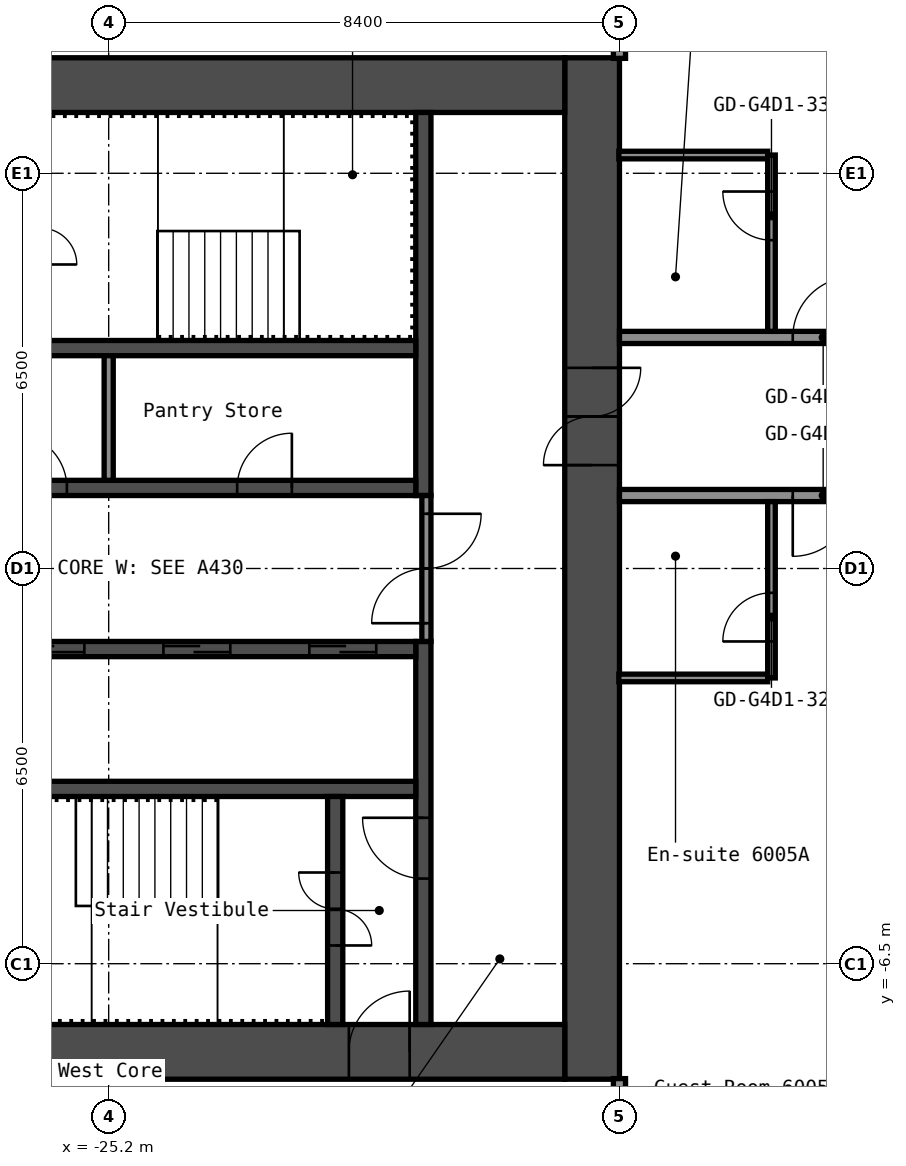
"""IFC4 building model, lengths in metres.
Left out: names, types, materials, properties, quantities, classifications, styles, units other than length and angle.
Written with IfcOpenShell. Run it as: python <this file> out.ifc"""

import sys

from ifc_helpers import new_model, si_unit, direction, frame, frame_2d, origin, place, context, subcontext, project, spatial, rectangle, extrude, element, fill, save


model = new_model("IFC4")
c1 = context("Model", 3, precision=1e-05, world=origin(), true_north=direction((0.0, 1.0)))
c2 = subcontext(c1, "Body", "Model", "MODEL_VIEW")
j1 = project(units=[si_unit("LENGTHUNIT", "METRE"), si_unit("PLANEANGLEUNIT", "RADIAN")], contexts=[c1])
p1 = place(None, origin())
s1 = spatial("IfcSite", under=j1, at=p1, CompositionType="ELEMENT")
p2 = place(p1, origin())
s2 = spatial("IfcBuilding", under=s1, at=p2, CompositionType="ELEMENT")
p3 = place(p2, frame((0.0, 0.0, 212.2)))
s3 = spatial("IfcBuildingStorey", under=s2, at=p3, CompositionType="ELEMENT", Elevation=212.2)
p4 = place(p3, frame((-17.25, -8.4, 0.0), z_axis=(0.0, 0.0, 1.0), x_axis=(0.0, 1.0, 0.0)))
e1 = element("IfcWall", 1, at=p4, inside=s3, PredefinedType="SHEAR", context=c2, shape_type="SweptSolid", body=[
    extrude(rectangle(XDim=16.8, YDim=0.9, at=frame_2d((8.4, 0.0))), origin(), (0.0, 0.0, 1.0), 2.75),
])
p5 = place(p4, frame((10.1, 0.0, 0.0)))
e2 = element("IfcOpeningElement", 2, at=p5, cuts=e1, PredefinedType="OPENING", context=c2, shape_type="SweptSolid", body=[
    extrude(rectangle(XDim=1.6, YDim=2.1, at=frame_2d((0.8, 1.05))), frame((0.0, 0.46, 0.0), z_axis=(0.0, -1.0, 0.0), x_axis=(1.0, 0.0, 0.0)), (0.0, 0.0, 1.0), 0.92),
])
p6 = place(p3, frame((-32.7, 7.95, 0.0), z_axis=(0.0, 0.0, 1.0), x_axis=(1.0, 0.0, 0.0)))
e3 = element("IfcWall", 3, at=p6, inside=s3, PredefinedType="SHEAR", context=c2, shape_type="SweptSolid", body=[
    extrude(rectangle(XDim=15.0, YDim=0.9, at=frame_2d((7.5, 0.0))), origin(), (0.0, 0.0, 1.0), 2.75),
])
p7 = place(p6, frame((3.4, 0.0, 0.0)))
e4 = element("IfcOpeningElement", 4, at=p7, cuts=e3, PredefinedType="OPENING", context=c2, shape_type="SweptSolid", body=[
    extrude(rectangle(XDim=1.2, YDim=2.1, at=frame_2d((0.6, 1.05))), frame((0.0, 0.46, 0.0), z_axis=(0.0, -1.0, 0.0), x_axis=(1.0, 0.0, 0.0)), (0.0, 0.0, 1.0), 0.92),
])
p8 = place(p6, frame((0.75, 0.0, 0.0)))
e5 = element("IfcOpeningElement", 5, at=p8, cuts=e3, PredefinedType="OPENING", context=c2, shape_type="SweptSolid", body=[
    extrude(rectangle(XDim=0.9, YDim=2.1, at=frame_2d((0.45, 1.05))), frame((0.0, 0.46, 0.0), z_axis=(0.0, -1.0, 0.0), x_axis=(1.0, 0.0, 0.0)), (0.0, 0.0, 1.0), 0.92),
])
p9 = place(p3, frame((-32.7, -7.95, 0.0), z_axis=(0.0, 0.0, 1.0), x_axis=(1.0, 0.0, 0.0)))
e6 = element("IfcWall", 6, at=p9, inside=s3, PredefinedType="SHEAR", context=c2, shape_type="SweptSolid", body=[
    extrude(rectangle(XDim=15.0, YDim=0.9, at=frame_2d((7.5, 0.0))), origin(), (0.0, 0.0, 1.0), 2.75),
])
p10 = place(p9, frame((11.45, 0.0, 0.0)))
e7 = element("IfcOpeningElement", 7, at=p10, cuts=e6, PredefinedType="OPENING", context=c2, shape_type="SweptSolid", body=[
    extrude(rectangle(XDim=1.0, YDim=2.1, at=frame_2d((0.5, 1.05))), frame((0.0, 0.46, 0.0), z_axis=(0.0, -1.0, 0.0), x_axis=(1.0, 0.0, 0.0)), (0.0, 0.0, 1.0), 0.92),
])
p11 = place(p3, frame((-20.025, 1.2, 0.0), z_axis=(0.0, 0.0, 1.0), x_axis=(0.0, 1.0, 0.0)))
e8 = element("IfcWall", 8, at=p11, inside=s3, PredefinedType="SHEAR", context=c2, shape_type="SweptSolid", body=[
    extrude(rectangle(XDim=6.3, YDim=0.25, at=frame_2d((3.15, 0.0))), origin(), (0.0, 0.0, 1.0), 2.75),
])
p12 = place(p3, frame((-20.025, -7.5, 0.0), z_axis=(0.0, 0.0, 1.0), x_axis=(0.0, 1.0, 0.0)))
e9 = element("IfcWall", 9, at=p12, inside=s3, PredefinedType="SHEAR", context=c2, shape_type="SweptSolid", body=[
    extrude(rectangle(XDim=6.3, YDim=0.25, at=frame_2d((3.15, 0.0))), origin(), (0.0, 0.0, 1.0), 2.75),
])
p13 = place(p12, frame((2.4, 0.0, 0.0)))
e10 = element("IfcOpeningElement", 10, at=p13, cuts=e9, PredefinedType="OPENING", context=c2, shape_type="SweptSolid", body=[
    extrude(rectangle(XDim=1.0, YDim=2.1, at=frame_2d((0.5, 1.05))), frame((0.0, 0.135, 0.0), z_axis=(0.0, -1.0, 0.0), x_axis=(1.0, 0.0, 0.0)), (0.0, 0.0, 1.0), 0.27),
])
p14 = place(p3, frame((-27.65, 1.325, 0.0), z_axis=(0.0, 0.0, 1.0), x_axis=(1.0, 0.0, 0.0)))
e11 = element("IfcWall", 11, at=p14, inside=s3, PredefinedType="SHEAR", context=c2, shape_type="SweptSolid", body=[
    extrude(rectangle(XDim=7.5, YDim=0.25, at=frame_2d((3.75, 0.0))), origin(), (0.0, 0.0, 1.0), 2.75),
])
p15 = place(p14, frame((4.562, 0.0, 0.0)))
e12 = element("IfcOpeningElement", 12, at=p15, cuts=e11, PredefinedType="OPENING", context=c2, shape_type="SweptSolid", body=[
    extrude(rectangle(XDim=0.9, YDim=2.1, at=frame_2d((0.45, 1.05))), frame((0.0, 0.135, 0.0), z_axis=(0.0, -1.0, 0.0), x_axis=(1.0, 0.0, 0.0)), (0.0, 0.0, 1.0), 0.27),
])
p16 = place(p14, frame((0.863, 0.0, 0.0)))
e13 = element("IfcOpeningElement", 13, at=p16, cuts=e11, PredefinedType="OPENING", context=c2, shape_type="SweptSolid", body=[
    extrude(rectangle(XDim=0.9, YDim=2.1, at=frame_2d((0.45, 1.05))), frame((0.0, 0.135, 0.0), z_axis=(0.0, -1.0, 0.0), x_axis=(1.0, 0.0, 0.0)), (0.0, 0.0, 1.0), 0.27),
])
p17 = place(p3, frame((-27.65, 3.625, 0.0), z_axis=(0.0, 0.0, 1.0), x_axis=(1.0, 0.0, 0.0)))
e14 = element("IfcWall", 14, at=p17, inside=s3, PredefinedType="SHEAR", context=c2, shape_type="SweptSolid", body=[
    extrude(rectangle(XDim=7.5, YDim=0.25, at=frame_2d((3.75, 0.0))), origin(), (0.0, 0.0, 1.0), 2.75),
])
p18 = place(p3, frame((-27.65, -1.325, 0.0), z_axis=(0.0, 0.0, 1.0), x_axis=(1.0, 0.0, 0.0)))
e15 = element("IfcWall", 15, at=p18, inside=s3, PredefinedType="SHEAR", context=c2, shape_type="SweptSolid", body=[
    extrude(rectangle(XDim=7.5, YDim=0.25, at=frame_2d((3.75, 0.0))), origin(), (0.0, 0.0, 1.0), 2.75),
])
p19 = place(p18, frame((5.75, 0.0, 0.0)))
e16 = element("IfcOpeningElement", 16, at=p19, cuts=e15, PredefinedType="OPENING", context=c2, shape_type="SweptSolid", body=[
    extrude(rectangle(XDim=1.1, YDim=2.1, at=frame_2d((0.55, 1.05))), frame((0.0, 0.135, 0.0), z_axis=(0.0, -1.0, 0.0), x_axis=(1.0, 0.0, 0.0)), (0.0, 0.0, 1.0), 0.27),
])
p20 = place(p18, frame((3.35, 0.0, 0.0)))
e17 = element("IfcOpeningElement", 17, at=p20, cuts=e15, PredefinedType="OPENING", context=c2, shape_type="SweptSolid", body=[
    extrude(rectangle(XDim=1.1, YDim=2.1, at=frame_2d((0.55, 1.05))), frame((0.0, 0.135, 0.0), z_axis=(0.0, -1.0, 0.0), x_axis=(1.0, 0.0, 0.0)), (0.0, 0.0, 1.0), 0.27),
])
p21 = place(p18, frame((0.95, 0.0, 0.0)))
e18 = element("IfcOpeningElement", 18, at=p21, cuts=e15, PredefinedType="OPENING", context=c2, shape_type="SweptSolid", body=[
    extrude(rectangle(XDim=1.1, YDim=2.1, at=frame_2d((0.55, 1.05))), frame((0.0, 0.135, 0.0), z_axis=(0.0, -1.0, 0.0), x_axis=(1.0, 0.0, 0.0)), (0.0, 0.0, 1.0), 0.27),
])
p22 = place(p3, frame((-27.65, -3.625, 0.0), z_axis=(0.0, 0.0, 1.0), x_axis=(1.0, 0.0, 0.0)))
e19 = element("IfcWall", 19, at=p22, inside=s3, PredefinedType="SHEAR", context=c2, shape_type="SweptSolid", body=[
    extrude(rectangle(XDim=7.5, YDim=0.25, at=frame_2d((3.75, 0.0))), origin(), (0.0, 0.0, 1.0), 2.75),
])
p23 = place(p3, frame((-21.475, -7.5, 0.0), z_axis=(0.0, 0.0, 1.0), x_axis=(0.0, 1.0, 0.0)))
e20 = element("IfcWall", 20, at=p23, inside=s3, PredefinedType="SHEAR", context=c2, shape_type="SweptSolid", body=[
    extrude(rectangle(XDim=3.75, YDim=0.25, at=frame_2d((1.875, 0.0))), origin(), (0.0, 0.0, 1.0), 2.75),
])
p24 = place(p23, frame((1.3, 0.0, 0.0)))
e21 = element("IfcOpeningElement", 21, at=p24, cuts=e20, PredefinedType="OPENING", context=c2, shape_type="SweptSolid", body=[
    extrude(rectangle(XDim=1.2, YDim=2.1, at=frame_2d((0.6, 1.05))), frame((0.0, 0.135, 0.0), z_axis=(0.0, -1.0, 0.0), x_axis=(1.0, 0.0, 0.0)), (0.0, 0.0, 1.0), 0.27),
])
p25 = place(p3, frame((-19.975, -1.2, 0.0), z_axis=(0.0, 0.0, 1.0), x_axis=(0.0, 1.0, 0.0)))
e22 = element("IfcWall", 22, at=p25, inside=s3, PredefinedType="PARTITIONING", context=c2, shape_type="SweptSolid", body=[
    extrude(rectangle(XDim=2.4, YDim=0.15, at=frame_2d((1.2, 0.0))), origin(), (0.0, 0.0, 1.0), 2.75),
])
p26 = place(p25, frame((0.3, 0.0, 0.0)))
e23 = element("IfcOpeningElement", 23, at=p26, cuts=e22, PredefinedType="OPENING", context=c2, shape_type="SweptSolid", body=[
    extrude(rectangle(XDim=1.8, YDim=2.1, at=frame_2d((0.9, 1.05))), frame((0.0, 0.085, 0.0), z_axis=(0.0, -1.0, 0.0), x_axis=(1.0, 0.0, 0.0)), (0.0, 0.0, 1.0), 0.17),
])
p27 = place(p3, frame((-25.2, 1.45, 0.0), z_axis=(0.0, 0.0, 1.0), x_axis=(0.0, 1.0, 0.0)))
e24 = element("IfcWall", 24, at=p27, inside=s3, PredefinedType="PARTITIONING", context=c2, shape_type="SweptSolid", body=[
    extrude(rectangle(XDim=2.05, YDim=0.15, at=frame_2d((1.025, 0.0))), origin(), (0.0, 0.0, 1.0), 2.75),
])
p28 = place(p3, frame((-16.81, -1.8, 0.0), z_axis=(0.0, 0.0, 1.0), x_axis=(1.0, 0.0, 0.0)))
e25 = element("IfcWall", 25, at=p28, inside=s3, PredefinedType="PARTITIONING", context=c2, shape_type="SweptSolid", body=[
    extrude(rectangle(XDim=2.448, YDim=0.125, at=frame_2d((1.224, 0.0))), origin(), (0.0, 0.0, 1.0), 2.75),
])
p29 = place(p3, frame((-16.8, 1.2, 0.0), z_axis=(0.0, 0.0, 1.0), x_axis=(1.0, 0.0, 0.0)))
e26 = element("IfcWall", 26, at=p29, inside=s3, PredefinedType="PARTITIONING", context=c2, shape_type="SweptSolid", body=[
    extrude(rectangle(XDim=33.6, YDim=0.2, at=frame_2d((16.8, 0.0))), origin(), (0.0, 0.0, 1.0), 2.75),
])
p30 = place(p29, frame((2.85, 0.0, 0.0)))
e27 = element("IfcOpeningElement", 27, at=p30, cuts=e26, PredefinedType="OPENING", context=c2, shape_type="SweptSolid", body=[
    extrude(rectangle(XDim=1.0, YDim=2.1, at=frame_2d((0.5, 1.05))), frame((0.0, 0.11, 0.0), z_axis=(0.0, -1.0, 0.0), x_axis=(1.0, 0.0, 0.0)), (0.0, 0.0, 1.0), 0.22),
])
p31 = place(p29, frame((4.55, 0.0, 0.0)))
e28 = element("IfcOpeningElement", 28, at=p31, cuts=e26, PredefinedType="OPENING", context=c2, shape_type="SweptSolid", body=[
    extrude(rectangle(XDim=1.0, YDim=2.1, at=frame_2d((0.5, 1.05))), frame((0.0, 0.11, 0.0), z_axis=(0.0, -1.0, 0.0), x_axis=(1.0, 0.0, 0.0)), (0.0, 0.0, 1.0), 0.22),
])
p32 = place(p29, frame((12.1, 0.0, 0.0)))
e29 = element("IfcOpeningElement", 29, at=p32, cuts=e26, PredefinedType="OPENING", context=c2, shape_type="SweptSolid", body=[
    extrude(rectangle(XDim=1.0, YDim=2.1, at=frame_2d((0.5, 1.05))), frame((0.0, 0.11, 0.0), z_axis=(0.0, -1.0, 0.0), x_axis=(1.0, 0.0, 0.0)), (0.0, 0.0, 1.0), 0.22),
])
p33 = place(p29, frame((22.3, 0.0, 0.0)))
e30 = element("IfcOpeningElement", 30, at=p33, cuts=e26, PredefinedType="OPENING", context=c2, shape_type="SweptSolid", body=[
    extrude(rectangle(XDim=1.0, YDim=2.1, at=frame_2d((0.5, 1.05))), frame((0.0, 0.11, 0.0), z_axis=(0.0, -1.0, 0.0), x_axis=(1.0, 0.0, 0.0)), (0.0, 0.0, 1.0), 0.22),
])
p34 = place(p29, frame((27.2, 0.0, 0.0)))
e31 = element("IfcOpeningElement", 31, at=p34, cuts=e26, PredefinedType="OPENING", context=c2, shape_type="SweptSolid", body=[
    extrude(rectangle(XDim=1.0, YDim=2.1, at=frame_2d((0.5, 1.05))), frame((0.0, 0.11, 0.0), z_axis=(0.0, -1.0, 0.0), x_axis=(1.0, 0.0, 0.0)), (0.0, 0.0, 1.0), 0.22),
])
p35 = place(p3, frame((-16.8, 3.8, 0.0), z_axis=(0.0, 0.0, 1.0), x_axis=(1.0, 0.0, 0.0)))
e32 = element("IfcWall", 32, at=p35, inside=s3, PredefinedType="PARTITIONING", context=c2, shape_type="SweptSolid", body=[
    extrude(rectangle(XDim=33.6, YDim=0.2, at=frame_2d((16.8, 0.0))), origin(), (0.0, 0.0, 1.0), 2.75),
])
p36 = place(p35, frame((2.85, 0.0, 0.0)))
e33 = element("IfcOpeningElement", 33, at=p36, cuts=e32, PredefinedType="OPENING", context=c2, shape_type="SweptSolid", body=[
    extrude(rectangle(XDim=1.0, YDim=2.1, at=frame_2d((0.5, 1.05))), frame((0.0, 0.11, 0.0), z_axis=(0.0, -1.0, 0.0), x_axis=(1.0, 0.0, 0.0)), (0.0, 0.0, 1.0), 0.22),
])
p37 = place(p35, frame((4.55, 0.0, 0.0)))
e34 = element("IfcOpeningElement", 34, at=p37, cuts=e32, PredefinedType="OPENING", context=c2, shape_type="SweptSolid", body=[
    extrude(rectangle(XDim=1.0, YDim=2.1, at=frame_2d((0.5, 1.05))), frame((0.0, 0.11, 0.0), z_axis=(0.0, -1.0, 0.0), x_axis=(1.0, 0.0, 0.0)), (0.0, 0.0, 1.0), 0.22),
])
p38 = place(p35, frame((10.4, 0.0, 0.0)))
e35 = element("IfcOpeningElement", 35, at=p38, cuts=e32, PredefinedType="OPENING", context=c2, shape_type="SweptSolid", body=[
    extrude(rectangle(XDim=1.0, YDim=2.1, at=frame_2d((0.5, 1.05))), frame((0.0, 0.11, 0.0), z_axis=(0.0, -1.0, 0.0), x_axis=(1.0, 0.0, 0.0)), (0.0, 0.0, 1.0), 0.22),
])
p39 = place(p35, frame((19.65, 0.0, 0.0)))
e36 = element("IfcOpeningElement", 36, at=p39, cuts=e32, PredefinedType="OPENING", context=c2, shape_type="SweptSolid", body=[
    extrude(rectangle(XDim=1.0, YDim=2.1, at=frame_2d((0.5, 1.05))), frame((0.0, 0.11, 0.0), z_axis=(0.0, -1.0, 0.0), x_axis=(1.0, 0.0, 0.0)), (0.0, 0.0, 1.0), 0.22),
])
p40 = place(p35, frame((21.35, 0.0, 0.0)))
e37 = element("IfcOpeningElement", 37, at=p40, cuts=e32, PredefinedType="OPENING", context=c2, shape_type="SweptSolid", body=[
    extrude(rectangle(XDim=1.0, YDim=2.1, at=frame_2d((0.5, 1.05))), frame((0.0, 0.11, 0.0), z_axis=(0.0, -1.0, 0.0), x_axis=(1.0, 0.0, 0.0)), (0.0, 0.0, 1.0), 0.22),
])
p41 = place(p35, frame((27.2, 0.0, 0.0)))
e38 = element("IfcOpeningElement", 38, at=p41, cuts=e32, PredefinedType="OPENING", context=c2, shape_type="SweptSolid", body=[
    extrude(rectangle(XDim=1.0, YDim=2.1, at=frame_2d((0.5, 1.05))), frame((0.0, 0.11, 0.0), z_axis=(0.0, -1.0, 0.0), x_axis=(1.0, 0.0, 0.0)), (0.0, 0.0, 1.0), 0.22),
])
p42 = place(p3, frame((-16.81, 6.8, 0.0), z_axis=(0.0, 0.0, 1.0), x_axis=(1.0, 0.0, 0.0)))
e39 = element("IfcWall", 39, at=p42, inside=s3, PredefinedType="PARTITIONING", context=c2, shape_type="SweptSolid", body=[
    extrude(rectangle(XDim=2.448, YDim=0.125, at=frame_2d((1.224, 0.0))), origin(), (0.0, 0.0, 1.0), 2.75),
])
p43 = place(p3, frame((-16.8, -15.55, 0.0), z_axis=(0.0, 0.0, 1.0), x_axis=(0.0, 1.0, 0.0)))
e40 = element("IfcWall", 40, at=p43, inside=s3, PredefinedType="PARTITIONING", context=c2, shape_type="SweptSolid", body=[
    extrude(rectangle(XDim=7.16, YDim=0.2, at=frame_2d((3.58, 0.0))), origin(), (0.0, 0.0, 1.0), 2.75),
])
p44 = place(p3, frame((-16.8, 8.39, 0.0), z_axis=(0.0, 0.0, 1.0), x_axis=(0.0, 1.0, 0.0)))
e41 = element("IfcWall", 41, at=p44, inside=s3, PredefinedType="PARTITIONING", context=c2, shape_type="SweptSolid", body=[
    extrude(rectangle(XDim=12.16, YDim=0.2, at=frame_2d((6.08, 0.0))), origin(), (0.0, 0.0, 1.0), 2.75),
])
p45 = place(p3, frame((-14.3, -1.8, 0.0), z_axis=(0.0, 0.0, 1.0), x_axis=(0.0, 1.0, 0.0)))
e42 = element("IfcWall", 42, at=p45, inside=s3, PredefinedType="PARTITIONING", context=c2, shape_type="SweptSolid", body=[
    extrude(rectangle(XDim=2.9, YDim=0.125, at=frame_2d((1.45, 0.0))), origin(), (0.0, 0.0, 1.0), 2.75),
])
p46 = place(p45, frame((0.6, 0.0, 0.0)))
e43 = element("IfcOpeningElement", 43, at=p46, cuts=e42, PredefinedType="OPENING", context=c2, shape_type="SweptSolid", body=[
    extrude(rectangle(XDim=0.8, YDim=2.1, at=frame_2d((0.4, 1.05))), frame((0.0, 0.073, 0.0), z_axis=(0.0, -1.0, 0.0), x_axis=(1.0, 0.0, 0.0)), (0.0, 0.0, 1.0), 0.145),
])
p47 = place(p3, frame((-14.3, 3.9, 0.0), z_axis=(0.0, 0.0, 1.0), x_axis=(0.0, 1.0, 0.0)))
e44 = element("IfcWall", 44, at=p47, inside=s3, PredefinedType="PARTITIONING", context=c2, shape_type="SweptSolid", body=[
    extrude(rectangle(XDim=2.9, YDim=0.125, at=frame_2d((1.45, 0.0))), origin(), (0.0, 0.0, 1.0), 2.75),
])
p48 = place(p47, frame((1.5, 0.0, 0.0)))
e45 = element("IfcOpeningElement", 45, at=p48, cuts=e44, PredefinedType="OPENING", context=c2, shape_type="SweptSolid", body=[
    extrude(rectangle(XDim=0.8, YDim=2.1, at=frame_2d((0.4, 1.05))), frame((0.0, 0.073, 0.0), z_axis=(0.0, -1.0, 0.0), x_axis=(1.0, 0.0, 0.0)), (0.0, 0.0, 1.0), 0.145),
])
p49 = place(p5, origin())
e46 = element("IfcDoor", 46, at=p49, inside=s3, OperationType="DOUBLE_DOOR_SINGLE_SWING", PredefinedType="DOOR", context=c2, shape_type="SweptSolid", body=[
    extrude(rectangle(XDim=1.6, YDim=2.1, at=frame_2d((0.8, 1.05))), frame((0.0, 0.025, 0.0), z_axis=(0.0, -1.0, 0.0), x_axis=(1.0, 0.0, 0.0)), (0.0, 0.0, 1.0), 0.05),
])
fill(e2, e46)
p50 = place(p10, origin())
e47 = element("IfcDoor", 47, at=p50, inside=s3, OperationType="SINGLE_SWING_LEFT", PredefinedType="DOOR", context=c2, shape_type="SweptSolid", body=[
    extrude(rectangle(XDim=1.0, YDim=2.1, at=frame_2d((0.5, 1.05))), frame((0.0, 0.025, 0.0), z_axis=(0.0, -1.0, 0.0), x_axis=(1.0, 0.0, 0.0)), (0.0, 0.0, 1.0), 0.05),
])
fill(e7, e47)
p51 = place(p24, origin())
e48 = element("IfcDoor", 48, at=p51, inside=s3, OperationType="DOUBLE_DOOR_SINGLE_SWING", PredefinedType="DOOR", context=c2, shape_type="SweptSolid", body=[
    extrude(rectangle(XDim=1.2, YDim=2.1, at=frame_2d((0.6, 1.05))), frame((0.0, 0.025, 0.0), z_axis=(0.0, -1.0, 0.0), x_axis=(1.0, 0.0, 0.0)), (0.0, 0.0, 1.0), 0.05),
])
fill(e21, e48)
p52 = place(p13, origin())
e49 = element("IfcDoor", 49, at=p52, inside=s3, OperationType="SINGLE_SWING_LEFT", PredefinedType="DOOR", context=c2, shape_type="SweptSolid", body=[
    extrude(rectangle(XDim=1.0, YDim=2.1, at=frame_2d((0.5, 1.05))), frame((0.0, 0.025, 0.0), z_axis=(0.0, -1.0, 0.0), x_axis=(1.0, 0.0, 0.0)), (0.0, 0.0, 1.0), 0.05),
])
fill(e10, e49)
p53 = place(p26, origin())
e50 = element("IfcDoor", 50, at=p53, inside=s3, OperationType="DOUBLE_DOOR_SINGLE_SWING", PredefinedType="DOOR", context=c2, shape_type="SweptSolid", body=[
    extrude(rectangle(XDim=1.8, YDim=2.1, at=frame_2d((0.9, 1.05))), frame((0.0, 0.025, 0.0), z_axis=(0.0, -1.0, 0.0), x_axis=(1.0, 0.0, 0.0)), (0.0, 0.0, 1.0), 0.05),
])
fill(e23, e50)
p54 = place(p15, origin())
e51 = element("IfcDoor", 51, at=p54, inside=s3, OperationType="SINGLE_SWING_LEFT", PredefinedType="DOOR", context=c2, shape_type="SweptSolid", body=[
    extrude(rectangle(XDim=0.9, YDim=2.1, at=frame_2d((0.45, 1.05))), frame((0.0, 0.025, 0.0), z_axis=(0.0, -1.0, 0.0), x_axis=(1.0, 0.0, 0.0)), (0.0, 0.0, 1.0), 0.05),
])
fill(e12, e51)
p55 = place(p16, origin())
e52 = element("IfcDoor", 52, at=p55, inside=s3, OperationType="SINGLE_SWING_RIGHT", PredefinedType="DOOR", context=c2, shape_type="SweptSolid", body=[
    extrude(rectangle(XDim=0.9, YDim=2.1, at=frame_2d((0.45, 1.05))), frame((0.0, 0.025, 0.0), z_axis=(0.0, -1.0, 0.0), x_axis=(1.0, 0.0, 0.0)), (0.0, 0.0, 1.0), 0.05),
])
fill(e13, e52)
p56 = place(p19, origin())
e53 = element("IfcDoor", 53, at=p56, inside=s3, OperationType="DOUBLE_DOOR_SLIDING", PredefinedType="DOOR", context=c2, shape_type="SweptSolid", body=[
    extrude(rectangle(XDim=1.1, YDim=2.1, at=frame_2d((0.55, 1.05))), frame((0.0, 0.025, 0.0), z_axis=(0.0, -1.0, 0.0), x_axis=(1.0, 0.0, 0.0)), (0.0, 0.0, 1.0), 0.05),
])
fill(e16, e53)
p57 = place(p20, origin())
e54 = element("IfcDoor", 54, at=p57, inside=s3, OperationType="DOUBLE_DOOR_SLIDING", PredefinedType="DOOR", context=c2, shape_type="SweptSolid", body=[
    extrude(rectangle(XDim=1.1, YDim=2.1, at=frame_2d((0.55, 1.05))), frame((0.0, 0.025, 0.0), z_axis=(0.0, -1.0, 0.0), x_axis=(1.0, 0.0, 0.0)), (0.0, 0.0, 1.0), 0.05),
])
fill(e17, e54)
p58 = place(p21, origin())
e55 = element("IfcDoor", 55, at=p58, inside=s3, OperationType="DOUBLE_DOOR_SLIDING", PredefinedType="DOOR", context=c2, shape_type="SweptSolid", body=[
    extrude(rectangle(XDim=1.1, YDim=2.1, at=frame_2d((0.55, 1.05))), frame((0.0, 0.025, 0.0), z_axis=(0.0, -1.0, 0.0), x_axis=(1.0, 0.0, 0.0)), (0.0, 0.0, 1.0), 0.05),
])
fill(e18, e55)
p59 = place(p30, origin())
e56 = element("IfcDoor", 56, at=p59, inside=s3, OperationType="SINGLE_SWING_LEFT", PredefinedType="DOOR", context=c2, shape_type="SweptSolid", body=[
    extrude(rectangle(XDim=1.0, YDim=2.1, at=frame_2d((0.5, 1.05))), frame((0.0, 0.025, 0.0), z_axis=(0.0, -1.0, 0.0), x_axis=(1.0, 0.0, 0.0)), (0.0, 0.0, 1.0), 0.05),
])
fill(e27, e56)
p60 = place(p36, origin())
e57 = element("IfcDoor", 57, at=p60, inside=s3, OperationType="SINGLE_SWING_LEFT", PredefinedType="DOOR", context=c2, shape_type="SweptSolid", body=[
    extrude(rectangle(XDim=1.0, YDim=2.1, at=frame_2d((0.5, 1.05))), frame((0.0, 0.025, 0.0), z_axis=(0.0, -1.0, 0.0), x_axis=(1.0, 0.0, 0.0)), (0.0, 0.0, 1.0), 0.05),
])
fill(e33, e57)
p61 = place(p46, origin())
e58 = element("IfcDoor", 58, at=p61, inside=s3, OperationType="SINGLE_SWING_RIGHT", PredefinedType="DOOR", context=c2, shape_type="SweptSolid", body=[
    extrude(rectangle(XDim=0.8, YDim=2.1, at=frame_2d((0.4, 1.05))), frame((0.0, 0.025, 0.0), z_axis=(0.0, -1.0, 0.0), x_axis=(1.0, 0.0, 0.0)), (0.0, 0.0, 1.0), 0.05),
])
fill(e43, e58)
p62 = place(p48, origin())
e59 = element("IfcDoor", 59, at=p62, inside=s3, OperationType="SINGLE_SWING_LEFT", PredefinedType="DOOR", context=c2, shape_type="SweptSolid", body=[
    extrude(rectangle(XDim=0.8, YDim=2.1, at=frame_2d((0.4, 1.05))), frame((0.0, 0.025, 0.0), z_axis=(0.0, -1.0, 0.0), x_axis=(1.0, 0.0, 0.0)), (0.0, 0.0, 1.0), 0.05),
])
fill(e45, e59)
save(model, sys.argv[1])
